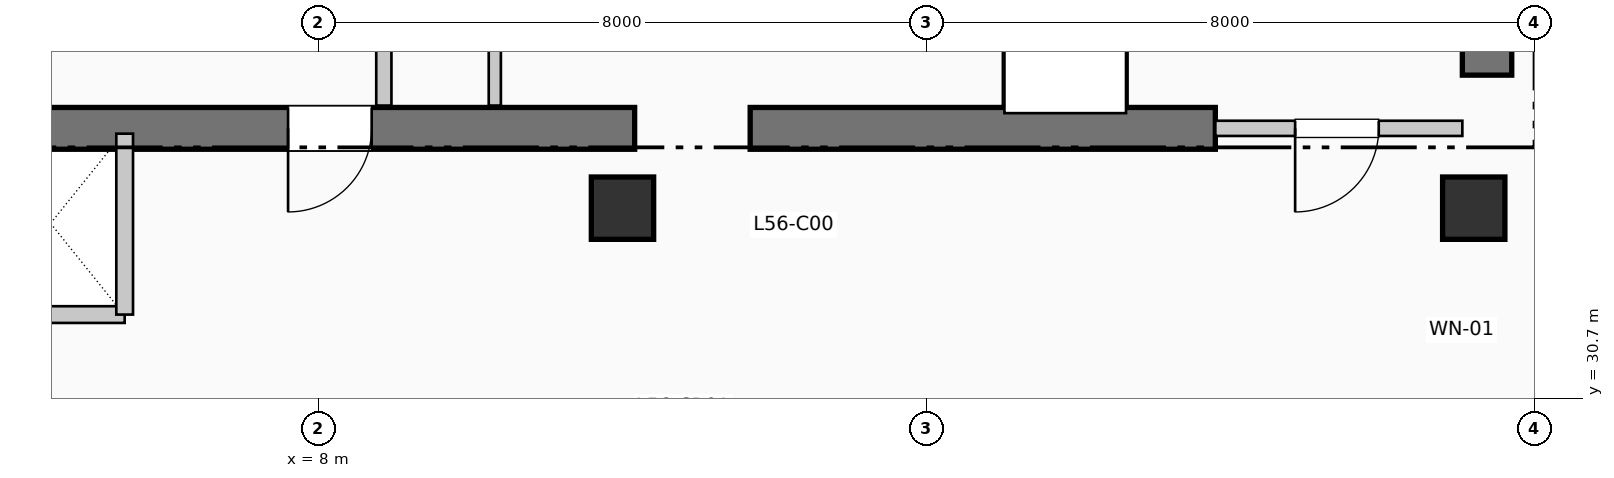
"""IFC4 building model, lengths in metres.
Left out: names, types, materials, properties, quantities, classifications, styles, units other than length and angle.
Written with IfcOpenShell. Run it as: python <this file> out.ifc"""

import sys

from ifc_helpers import new_model, si_unit, direction, frame, frame_2d, origin, origin_2d, place, context, subcontext, project, spatial, rectangle, extrude, element, fill, save


model = new_model("IFC4")
c1 = context("Model", 3, precision=1e-05, world=origin(), true_north=direction((0.0, 1.0)))
c2 = subcontext(c1, "Body", "Model", "MODEL_VIEW")
j1 = project(units=[si_unit("LENGTHUNIT", "METRE"), si_unit("PLANEANGLEUNIT", "RADIAN")], contexts=[c1])
p1 = place(None, origin())
s1 = spatial("IfcSite", under=j1, at=p1, CompositionType="ELEMENT")
p2 = place(p1, origin())
s2 = spatial("IfcBuilding", under=s1, at=p2, CompositionType="ELEMENT")
p3 = place(p2, frame((0.0, 0.0, 231.66)))
s3 = spatial("IfcBuildingStorey", under=s2, at=p3, CompositionType="ELEMENT", Elevation=231.66)
p4 = place(p3, frame((23.375, 34.95, 0.0), z_axis=(0.0, 0.0, 1.0), x_axis=(0.0, 1.0, 0.0)))
e1 = element("IfcWall", 1, at=p4, inside=s3, PredefinedType="SHEAR", context=c2, shape_type="SweptSolid", body=[
    extrude(rectangle(XDim=10.64, YDim=0.65, at=frame_2d((5.32, 0.0))), origin(), (0.0, 0.0, 1.0), 3.96),
])
p5 = place(p3, frame((1.45, 34.25, 0.0), z_axis=(0.0, 0.0, 1.0), x_axis=(1.0, 0.0, 0.0)))
e2 = element("IfcWall", 2, at=p5, inside=s3, PredefinedType="SHEAR", context=c2, shape_type="SweptSolid", body=[
    extrude(rectangle(XDim=10.71, YDim=0.55, at=frame_2d((5.355, 0.0))), origin(), (0.0, 0.0, 1.0), 3.96),
])
p6 = place(p5, frame((7.25, 0.0, 0.0), z_axis=(0.0, 0.0, 1.0), x_axis=(-1.0, 0.0, 0.0)))
e3 = element("IfcOpeningElement", 3, at=p6, cuts=e2, PredefinedType="OPENING", context=c2, shape_type="SweptSolid", body=[
    extrude(rectangle(XDim=1.1, YDim=2.15, at=frame_2d((0.55, 1.075))), frame((0.0, 0.285, 0.0), z_axis=(0.0, -1.0, 0.0), x_axis=(1.0, 0.0, 0.0)), (0.0, 0.0, 1.0), 0.57),
])
p7 = place(p3, frame((13.68, 34.25, 0.0), z_axis=(0.0, 0.0, 1.0), x_axis=(1.0, 0.0, 0.0)))
e4 = element("IfcWall", 4, at=p7, inside=s3, PredefinedType="SHEAR", context=c2, shape_type="SweptSolid", body=[
    extrude(rectangle(XDim=6.12, YDim=0.55, at=frame_2d((3.06, 0.0))), origin(), (0.0, 0.0, 1.0), 3.96),
])
for number, where, z_axis, x_axis in (
    (5, (12.0, 33.2, 0.0), (0.0, 0.0, 1.0), (1.0, 0.0, 0.0)),
    (6, (23.2, 33.2, 0.0), (0.0, 0.0, 1.0), (1.0, 0.0, 0.0)),
):
    element("IfcColumn", number, at=place(p3, frame(where, z_axis=z_axis, x_axis=x_axis)), inside=s3, PredefinedType="COLUMN", context=c2, shape_type="SweptSolid", body=[
        extrude(rectangle(XDim=0.82, YDim=0.82, at=origin_2d()), origin(), (0.0, 0.0, 1.0), 3.96),
    ])
p8 = place(p3, frame((8.86, 34.55, 0.0), z_axis=(0.0, 0.0, 1.0), x_axis=(0.0, 1.0, 0.0)))
e7 = element("IfcWall", 7, at=p8, inside=s3, PredefinedType="PARTITIONING", context=c2, shape_type="SweptSolid", body=[
    extrude(rectangle(XDim=2.5, YDim=0.2, at=frame_2d((1.25, 0.0))), origin(), (0.0, 0.0, 1.0), 3.71),
])
p9 = place(p3, frame((19.8, 34.25, 0.0), z_axis=(0.0, 0.0, 1.0), x_axis=(1.0, 0.0, 0.0)))
e8 = element("IfcWall", 8, at=p9, inside=s3, PredefinedType="PARTITIONING", context=c2, shape_type="SweptSolid", body=[
    extrude(rectangle(XDim=3.25, YDim=0.2, at=frame_2d((1.625, 0.0))), origin(), (0.0, 0.0, 1.0), 3.71),
])
p10 = place(p9, frame((2.15, 0.0, 0.0), z_axis=(0.0, 0.0, 1.0), x_axis=(-1.0, 0.0, 0.0)))
e9 = element("IfcOpeningElement", 9, at=p10, cuts=e8, PredefinedType="OPENING", context=c2, shape_type="SweptSolid", body=[
    extrude(rectangle(XDim=1.1, YDim=2.15, at=frame_2d((0.55, 1.075))), frame((0.0, 0.11, 0.0), z_axis=(0.0, -1.0, 0.0), x_axis=(1.0, 0.0, 0.0)), (0.0, 0.0, 1.0), 0.22),
])
p11 = place(p3, frame((1.55, 31.8, 0.0), z_axis=(0.0, 0.0, 1.0), x_axis=(1.0, 0.0, 0.0)))
e10 = element("IfcWall", 10, at=p11, inside=s3, PredefinedType="PARTITIONING", context=c2, shape_type="SweptSolid", body=[
    extrude(rectangle(XDim=3.9, YDim=0.22, at=frame_2d((1.95, 0.0))), origin(), (0.0, 0.0, 1.0), 3.71),
])
p12 = place(p3, frame((5.45, 31.8, 0.0), z_axis=(0.0, 0.0, 1.0), x_axis=(0.0, 1.0, 0.0)))
e11 = element("IfcWall", 11, at=p12, inside=s3, PredefinedType="PARTITIONING", context=c2, shape_type="SweptSolid", body=[
    extrude(rectangle(XDim=2.38, YDim=0.22, at=frame_2d((1.19, 0.0))), origin(), (0.0, 0.0, 1.0), 3.71),
])
p13 = place(p3, frame((10.32, 34.55, 0.0), z_axis=(0.0, 0.0, 1.0), x_axis=(0.0, 1.0, 0.0)))
e12 = element("IfcWall", 12, at=p13, inside=s3, PredefinedType="PARTITIONING", context=c2, shape_type="SweptSolid", body=[
    extrude(rectangle(XDim=2.15, YDim=0.16, at=frame_2d((1.075, 0.0))), origin(), (0.0, 0.0, 1.0), 3.71),
])
p14 = place(p6, origin())
e13 = element("IfcDoor", 13, at=p14, inside=s3, OperationType="SINGLE_SWING_LEFT", PredefinedType="DOOR", context=c2, shape_type="SweptSolid", body=[
    extrude(rectangle(XDim=1.1, YDim=2.15, at=frame_2d((0.55, 1.075))), frame((0.0, 0.025, 0.0), z_axis=(0.0, -1.0, 0.0), x_axis=(1.0, 0.0, 0.0)), (0.0, 0.0, 1.0), 0.05),
])
fill(e3, e13)
p15 = place(p10, origin())
e14 = element("IfcDoor", 14, at=p15, inside=s3, OperationType="SINGLE_SWING_LEFT", PredefinedType="DOOR", context=c2, shape_type="SweptSolid", body=[
    extrude(rectangle(XDim=1.1, YDim=2.15, at=frame_2d((0.55, 1.075))), frame((0.0, 0.025, 0.0), z_axis=(0.0, -1.0, 0.0), x_axis=(1.0, 0.0, 0.0)), (0.0, 0.0, 1.0), 0.05),
])
fill(e9, e14)
save(model, sys.argv[1])
